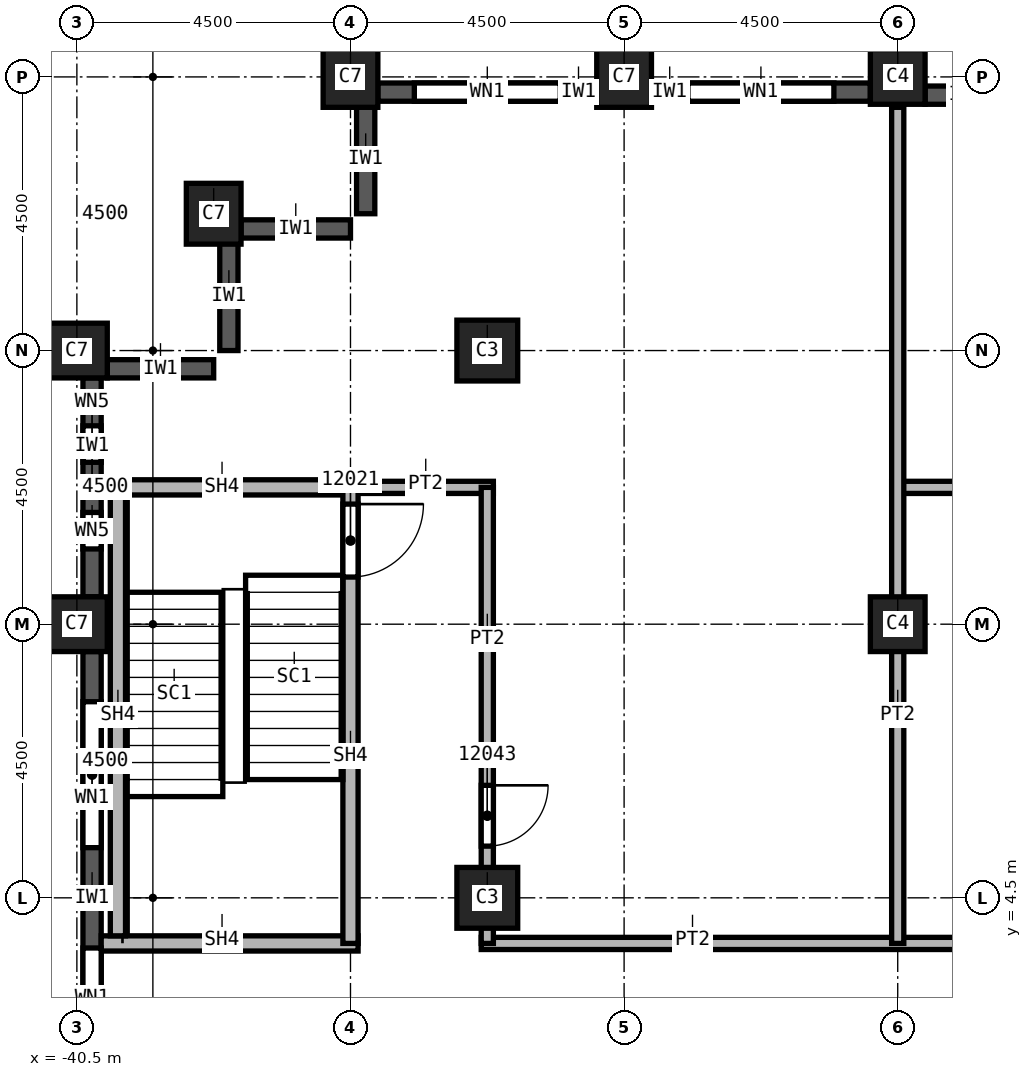
"""IFC4 building model, lengths in metres.
Left out: names, types, materials, properties, quantities, classifications, styles, units other than length and angle.
Written with IfcOpenShell. Run it as: python <this file> out.ifc"""

import sys

from ifc_helpers import new_model, si_unit, direction, frame, frame_2d, origin, origin_2d, place, context, subcontext, project, spatial, rectangle, extrude, element, fill, save


model = new_model("IFC4")
c1 = context("Model", 3, precision=1e-05, world=origin(), true_north=direction((0.0, 1.0)))
c2 = subcontext(c1, "Body", "Model", "MODEL_VIEW")
j1 = project(units=[si_unit("LENGTHUNIT", "METRE"), si_unit("PLANEANGLEUNIT", "RADIAN")], contexts=[c1])
p1 = place(None, origin())
s1 = spatial("IfcSite", under=j1, at=p1, CompositionType="ELEMENT")
p2 = place(p1, origin())
s2 = spatial("IfcBuilding", under=s1, at=p2, CompositionType="ELEMENT")
p3 = place(p2, frame((0.0, 0.0, 196.0)))
s3 = spatial("IfcBuildingStorey", under=s2, at=p3, CompositionType="ELEMENT", Elevation=196.0)
for number, where, z_axis, x_axis in (
    (1, (-40.5, 9.0, 0.0), (0.0, 0.0, 1.0), (0.0, 1.0, 0.0)),
    (2, (-40.5, 13.5, 0.0), (0.0, 0.0, 1.0), (0.0, 1.0, 0.0)),
    (3, (-38.25, 15.75, 0.0), (0.0, 0.0, 1.0), (1.0, 0.0, 0.0)),
    (4, (-31.5, 18.0, 0.0), (0.0, 0.0, 1.0), (1.0, 0.0, 0.0)),
    (5, (-36.0, 18.0, 0.0), (0.0, 0.0, 1.0), (1.0, 0.0, 0.0)),
):
    element("IfcColumn", number, at=place(p3, frame(where, z_axis=z_axis, x_axis=x_axis)), inside=s3, PredefinedType="COLUMN", context=c2, shape_type="SweptSolid", body=[
        extrude(rectangle(XDim=0.9, YDim=1.0, at=origin_2d()), origin(), (0.0, 0.0, 1.0), 3.72),
    ])
for number, where, z_axis, x_axis in (
    (6, (-33.75, 4.5, 0.0), (0.0, 0.0, 1.0), (1.0, 0.0, 0.0)),
    (7, (-33.75, 13.5, 0.0), (0.0, 0.0, 1.0), (1.0, 0.0, 0.0)),
):
    element("IfcColumn", number, at=place(p3, frame(where, z_axis=z_axis, x_axis=x_axis)), inside=s3, PredefinedType="COLUMN", context=c2, shape_type="SweptSolid", body=[
        extrude(rectangle(XDim=1.0, YDim=1.0, at=origin_2d()), origin(), (0.0, 0.0, 1.0), 3.72),
    ])
for number, where, z_axis, x_axis in (
    (8, (-27.0, 9.0, 0.0), (0.0, 0.0, 1.0), (1.0, 0.0, 0.0)),
    (9, (-27.0, 18.0, 0.0), (0.0, 0.0, 1.0), (1.0, 0.0, 0.0)),
):
    element("IfcColumn", number, at=place(p3, frame(where, z_axis=z_axis, x_axis=x_axis)), inside=s3, PredefinedType="COLUMN", context=c2, shape_type="SweptSolid", body=[
        extrude(rectangle(XDim=0.9, YDim=0.9, at=origin_2d()), origin(), (0.0, 0.0, 1.0), 3.72),
    ])
for number, where, z_axis, x_axis in (
    (10, (-35.75, 17.55, 0.0), (0.0, 0.0, 1.0), (0.0, -1.0, 0.0)),
    (11, (-37.8, 15.5, 0.0), (0.0, 0.0, 1.0), (1.0, 0.0, 0.0)),
    (12, (-38.0, 15.3, 0.0), (0.0, 0.0, 1.0), (0.0, -1.0, 0.0)),
):
    element("IfcWall", number, at=place(p3, frame(where, z_axis=z_axis, x_axis=x_axis)), inside=s3, PredefinedType="SOLIDWALL", context=c2, shape_type="SweptSolid", body=[
        extrude(rectangle(XDim=1.8, YDim=0.3, at=frame_2d((0.9, 0.0))), origin(), (0.0, 0.0, 1.0), 3.12),
    ])
p4 = place(p3, frame((-40.0, 13.2, 0.0), z_axis=(0.0, 0.0, 1.0), x_axis=(1.0, 0.0, 0.0)))
e13 = element("IfcWall", 13, at=p4, inside=s3, PredefinedType="SOLIDWALL", context=c2, shape_type="SweptSolid", body=[
    extrude(rectangle(XDim=1.75, YDim=0.3, at=frame_2d((0.875, 0.0))), origin(), (0.0, 0.0, 1.0), 3.12),
])
p5 = place(p3, frame((-25.2, 17.7, 0.0), z_axis=(0.0, 0.0, 1.0), x_axis=(-1.0, 0.0, 0.0)))
e14 = element("IfcWall", 14, at=p5, inside=s3, PredefinedType="SOLIDWALL", context=c2, shape_type="SweptSolid", body=[
    extrude(rectangle(XDim=1.35, YDim=0.3, at=frame_2d((0.675, 0.0))), origin(), (0.0, 0.0, 1.0), 3.12),
])
p6 = place(p3, frame((-27.45, 17.75, 0.0), z_axis=(0.0, 0.0, 1.0), x_axis=(-1.0, 0.0, 0.0)))
e15 = element("IfcWall", 15, at=p6, inside=s3, PredefinedType="SOLIDWALL", context=c2, shape_type="SweptSolid", body=[
    extrude(rectangle(XDim=3.6, YDim=0.3, at=frame_2d((1.8, 0.0))), origin(), (0.0, 0.0, 1.0), 3.12),
])
p7 = place(p6, frame((0.6, 0.0, 0.8)))
e16 = element("IfcOpeningElement", 16, at=p7, cuts=e15, PredefinedType="OPENING", context=c2, shape_type="SweptSolid", body=[
    extrude(rectangle(XDim=2.4, YDim=1.95, at=frame_2d((1.2, 0.975))), frame((0.0, 0.15, 0.0), z_axis=(0.0, -1.0, 0.0), x_axis=(1.0, 0.0, 0.0)), (0.0, 0.0, 1.0), 0.3),
])
p8 = place(p3, frame((-31.95, 17.75, 0.0), z_axis=(0.0, 0.0, 1.0), x_axis=(-1.0, 0.0, 0.0)))
e17 = element("IfcWall", 17, at=p8, inside=s3, PredefinedType="SOLIDWALL", context=c2, shape_type="SweptSolid", body=[
    extrude(rectangle(XDim=3.6, YDim=0.3, at=frame_2d((1.8, 0.0))), origin(), (0.0, 0.0, 1.0), 3.12),
])
p9 = place(p8, frame((0.6, 0.0, 0.8)))
e18 = element("IfcOpeningElement", 18, at=p9, cuts=e17, PredefinedType="OPENING", context=c2, shape_type="SweptSolid", body=[
    extrude(rectangle(XDim=2.4, YDim=1.95, at=frame_2d((1.2, 0.975))), frame((0.0, 0.15, 0.0), z_axis=(0.0, -1.0, 0.0), x_axis=(1.0, 0.0, 0.0)), (0.0, 0.0, 1.0), 0.3),
])
p10 = place(p3, frame((-40.25, 13.05, 0.0), z_axis=(0.0, 0.0, 1.0), x_axis=(0.0, -1.0, 0.0)))
e19 = element("IfcWall", 19, at=p10, inside=s3, PredefinedType="SOLIDWALL", context=c2, shape_type="SweptSolid", body=[
    extrude(rectangle(XDim=3.6, YDim=0.3, at=frame_2d((1.8, 0.0))), origin(), (0.0, 0.0, 1.0), 3.12),
])
p11 = place(p10, frame((0.788, 0.0, 0.8)))
e20 = element("IfcOpeningElement", 20, at=p11, cuts=e19, PredefinedType="OPENING", context=c2, shape_type="SweptSolid", body=[
    extrude(rectangle(XDim=0.6, YDim=1.95, at=frame_2d((0.3, 0.975))), frame((0.0, 0.15, 0.0), z_axis=(0.0, -1.0, 0.0), x_axis=(1.0, 0.0, 0.0)), (0.0, 0.0, 1.0), 0.3),
])
p12 = place(p10, frame((2.212, 0.0, 0.8)))
e21 = element("IfcOpeningElement", 21, at=p12, cuts=e19, PredefinedType="OPENING", context=c2, shape_type="SweptSolid", body=[
    extrude(rectangle(XDim=0.6, YDim=1.95, at=frame_2d((0.3, 0.975))), frame((0.0, 0.15, 0.0), z_axis=(0.0, -1.0, 0.0), x_axis=(1.0, 0.0, 0.0)), (0.0, 0.0, 1.0), 0.3),
])
p13 = place(p3, frame((-40.25, 8.55, 0.0), z_axis=(0.0, 0.0, 1.0), x_axis=(0.0, -1.0, 0.0)))
e22 = element("IfcWall", 22, at=p13, inside=s3, PredefinedType="SOLIDWALL", context=c2, shape_type="SweptSolid", body=[
    extrude(rectangle(XDim=8.1, YDim=0.3, at=frame_2d((4.05, 0.0))), origin(), (0.0, 0.0, 1.0), 3.12),
])
p14 = place(p13, frame((0.825, 0.0, 0.8)))
e23 = element("IfcOpeningElement", 23, at=p14, cuts=e22, PredefinedType="OPENING", context=c2, shape_type="SweptSolid", body=[
    extrude(rectangle(XDim=2.4, YDim=1.95, at=frame_2d((1.2, 0.975))), frame((0.0, 0.15, 0.0), z_axis=(0.0, -1.0, 0.0), x_axis=(1.0, 0.0, 0.0)), (0.0, 0.0, 1.0), 0.3),
])
p15 = place(p13, frame((4.875, 0.0, 0.8)))
e24 = element("IfcOpeningElement", 24, at=p15, cuts=e22, PredefinedType="OPENING", context=c2, shape_type="SweptSolid", body=[
    extrude(rectangle(XDim=2.4, YDim=1.95, at=frame_2d((1.2, 0.975))), frame((0.0, 0.15, 0.0), z_axis=(0.0, -1.0, 0.0), x_axis=(1.0, 0.0, 0.0)), (0.0, 0.0, 1.0), 0.3),
])
p16 = place(p3, frame((-36.0, 11.25, 0.0), z_axis=(0.0, 0.0, 1.0), x_axis=(1.0, 0.0, 0.0)))
e25 = element("IfcWall", 25, at=p16, inside=s3, PredefinedType="PARTITIONING", context=c2, shape_type="SweptSolid", body=[
    extrude(rectangle(XDim=2.35, YDim=0.2, at=frame_2d((1.175, 0.0))), origin(), (0.0, 0.0, 1.0), 3.72),
])
p17 = place(p3, frame((-33.85, 3.75, 0.0), z_axis=(0.0, 0.0, 1.0), x_axis=(1.0, 0.0, 0.0)))
e26 = element("IfcWall", 26, at=p17, inside=s3, PredefinedType="PARTITIONING", context=c2, shape_type="SweptSolid", body=[
    extrude(rectangle(XDim=13.95, YDim=0.2, at=frame_2d((6.975, 0.0))), origin(), (0.0, 0.0, 1.0), 3.72),
])
p18 = place(p3, frame((-33.75, 11.25, 0.0), z_axis=(0.0, 0.0, 1.0), x_axis=(0.0, -1.0, 0.0)))
e27 = element("IfcWall", 27, at=p18, inside=s3, PredefinedType="PARTITIONING", context=c2, shape_type="SweptSolid", body=[
    extrude(rectangle(XDim=7.5, YDim=0.2, at=frame_2d((3.75, 0.0))), origin(), (0.0, 0.0, 1.0), 3.72),
])
p19 = place(p18, frame((4.9, 0.0, 0.0)))
e28 = element("IfcOpeningElement", 28, at=p19, cuts=e27, PredefinedType="OPENING", context=c2, shape_type="SweptSolid", body=[
    extrude(rectangle(XDim=1.0, YDim=2.1, at=frame_2d((0.5, 1.05))), frame((0.0, 0.1, 0.0), z_axis=(0.0, -1.0, 0.0), x_axis=(1.0, 0.0, 0.0)), (0.0, 0.0, 1.0), 0.2),
])
p20 = place(p3, frame((-27.1, 11.25, 0.0), z_axis=(0.0, 0.0, 1.0), x_axis=(1.0, 0.0, 0.0)))
e29 = element("IfcWall", 29, at=p20, inside=s3, PredefinedType="PARTITIONING", context=c2, shape_type="SweptSolid", body=[
    extrude(rectangle(XDim=7.2, YDim=0.2, at=frame_2d((3.6, 0.0))), origin(), (0.0, 0.0, 1.0), 3.72),
])
p21 = place(p3, frame((-27.0, 3.75, 0.0), z_axis=(0.0, 0.0, 1.0), x_axis=(0.0, 1.0, 0.0)))
e30 = element("IfcWall", 30, at=p21, inside=s3, PredefinedType="PARTITIONING", context=c2, shape_type="SweptSolid", body=[
    extrude(rectangle(XDim=13.75, YDim=0.2, at=frame_2d((6.875, 0.0))), origin(), (0.0, 0.0, 1.0), 3.72),
])
p22 = place(p3, frame((-40.1, 3.75, 0.0), z_axis=(0.0, 0.0, 1.0), x_axis=(1.0, 0.0, 0.0)))
e31 = element("IfcWall", 31, at=p22, inside=s3, PredefinedType="SOLIDWALL", context=c2, shape_type="SweptSolid", body=[
    extrude(rectangle(XDim=4.225, YDim=0.25, at=frame_2d((2.113, 0.0))), origin(), (0.0, 0.0, 1.0), 3.72),
])
p23 = place(p3, frame((-40.1, 11.25, 0.0), z_axis=(0.0, 0.0, 1.0), x_axis=(1.0, 0.0, 0.0)))
e32 = element("IfcWall", 32, at=p23, inside=s3, PredefinedType="SOLIDWALL", context=c2, shape_type="SweptSolid", body=[
    extrude(rectangle(XDim=4.1, YDim=0.25, at=frame_2d((2.05, 0.0))), origin(), (0.0, 0.0, 1.0), 3.72),
])
p24 = place(p3, frame((-36.0, 11.375, 0.0), z_axis=(0.0, 0.0, 1.0), x_axis=(0.0, -1.0, 0.0)))
e33 = element("IfcWall", 33, at=p24, inside=s3, PredefinedType="SOLIDWALL", context=c2, shape_type="SweptSolid", body=[
    extrude(rectangle(XDim=7.625, YDim=0.25, at=frame_2d((3.812, 0.0))), origin(), (0.0, 0.0, 1.0), 3.72),
])
p25 = place(p24, frame((0.4, 0.0, 0.0)))
e34 = element("IfcOpeningElement", 34, at=p25, cuts=e33, PredefinedType="OPENING", context=c2, shape_type="SweptSolid", body=[
    extrude(rectangle(XDim=1.2, YDim=2.1, at=frame_2d((0.6, 1.05))), frame((0.0, 0.125, 0.0), z_axis=(0.0, -1.0, 0.0), x_axis=(1.0, 0.0, 0.0)), (0.0, 0.0, 1.0), 0.25),
])
p26 = place(p3, frame((-39.825, 3.875, 0.0), z_axis=(0.0, 0.0, 1.0), x_axis=(0.0, 1.0, 0.0)))
e35 = element("IfcWall", 35, at=p26, inside=s3, PredefinedType="SOLIDWALL", context=c2, shape_type="SweptSolid", body=[
    extrude(rectangle(XDim=7.25, YDim=0.25, at=frame_2d((3.625, 0.0))), origin(), (0.0, 0.0, 1.0), 3.72),
])
p27 = place(p7, origin())
e36 = element("IfcWindow", 36, at=p27, inside=s3, PartitioningType="SINGLE_PANEL", PredefinedType="WINDOW", context=c2, shape_type="SweptSolid", body=[
    extrude(rectangle(XDim=2.4, YDim=1.95, at=frame_2d((1.2, 0.975))), frame((0.0, 0.03, 0.0), z_axis=(0.0, -1.0, 0.0), x_axis=(1.0, 0.0, 0.0)), (0.0, 0.0, 1.0), 0.06),
])
fill(e16, e36)
p28 = place(p9, origin())
e37 = element("IfcWindow", 37, at=p28, inside=s3, PartitioningType="SINGLE_PANEL", PredefinedType="WINDOW", context=c2, shape_type="SweptSolid", body=[
    extrude(rectangle(XDim=2.4, YDim=1.95, at=frame_2d((1.2, 0.975))), frame((0.0, 0.03, 0.0), z_axis=(0.0, -1.0, 0.0), x_axis=(1.0, 0.0, 0.0)), (0.0, 0.0, 1.0), 0.06),
])
fill(e18, e37)
p29 = place(p14, origin())
e38 = element("IfcWindow", 38, at=p29, inside=s3, PartitioningType="SINGLE_PANEL", PredefinedType="WINDOW", context=c2, shape_type="SweptSolid", body=[
    extrude(rectangle(XDim=2.4, YDim=1.95, at=frame_2d((1.2, 0.975))), frame((0.0, 0.03, 0.0), z_axis=(0.0, -1.0, 0.0), x_axis=(1.0, 0.0, 0.0)), (0.0, 0.0, 1.0), 0.06),
])
fill(e23, e38)
p30 = place(p15, origin())
e39 = element("IfcWindow", 39, at=p30, inside=s3, PartitioningType="SINGLE_PANEL", PredefinedType="WINDOW", context=c2, shape_type="SweptSolid", body=[
    extrude(rectangle(XDim=2.4, YDim=1.95, at=frame_2d((1.2, 0.975))), frame((0.0, 0.03, 0.0), z_axis=(0.0, -1.0, 0.0), x_axis=(1.0, 0.0, 0.0)), (0.0, 0.0, 1.0), 0.06),
])
fill(e24, e39)
p31 = place(p25, origin())
e40 = element("IfcDoor", 40, at=p31, inside=s3, OperationType="SINGLE_SWING_RIGHT", PredefinedType="DOOR", context=c2, shape_type="SweptSolid", body=[
    extrude(rectangle(XDim=1.2, YDim=2.1, at=frame_2d((0.6, 1.05))), frame((0.0, 0.025, 0.0), z_axis=(0.0, -1.0, 0.0), x_axis=(1.0, 0.0, 0.0)), (0.0, 0.0, 1.0), 0.05),
])
fill(e34, e40)
p32 = place(p19, origin())
e41 = element("IfcDoor", 41, at=p32, inside=s3, OperationType="SINGLE_SWING_RIGHT", PredefinedType="DOOR", context=c2, shape_type="SweptSolid", body=[
    extrude(rectangle(XDim=1.0, YDim=2.1, at=frame_2d((0.5, 1.05))), frame((0.0, 0.025, 0.0), z_axis=(0.0, -1.0, 0.0), x_axis=(1.0, 0.0, 0.0)), (0.0, 0.0, 1.0), 0.05),
])
fill(e28, e41)
p33 = place(p11, origin())
e42 = element("IfcWindow", 42, at=p33, inside=s3, PartitioningType="SINGLE_PANEL", PredefinedType="WINDOW", context=c2, shape_type="SweptSolid", body=[
    extrude(rectangle(XDim=0.6, YDim=1.95, at=frame_2d((0.3, 0.975))), frame((0.0, 0.03, 0.0), z_axis=(0.0, -1.0, 0.0), x_axis=(1.0, 0.0, 0.0)), (0.0, 0.0, 1.0), 0.06),
])
fill(e20, e42)
p34 = place(p12, origin())
e43 = element("IfcWindow", 43, at=p34, inside=s3, PartitioningType="SINGLE_PANEL", PredefinedType="WINDOW", context=c2, shape_type="SweptSolid", body=[
    extrude(rectangle(XDim=0.6, YDim=1.95, at=frame_2d((0.3, 0.975))), frame((0.0, 0.03, 0.0), z_axis=(0.0, -1.0, 0.0), x_axis=(1.0, 0.0, 0.0)), (0.0, 0.0, 1.0), 0.06),
])
fill(e21, e43)
save(model, sys.argv[1])
